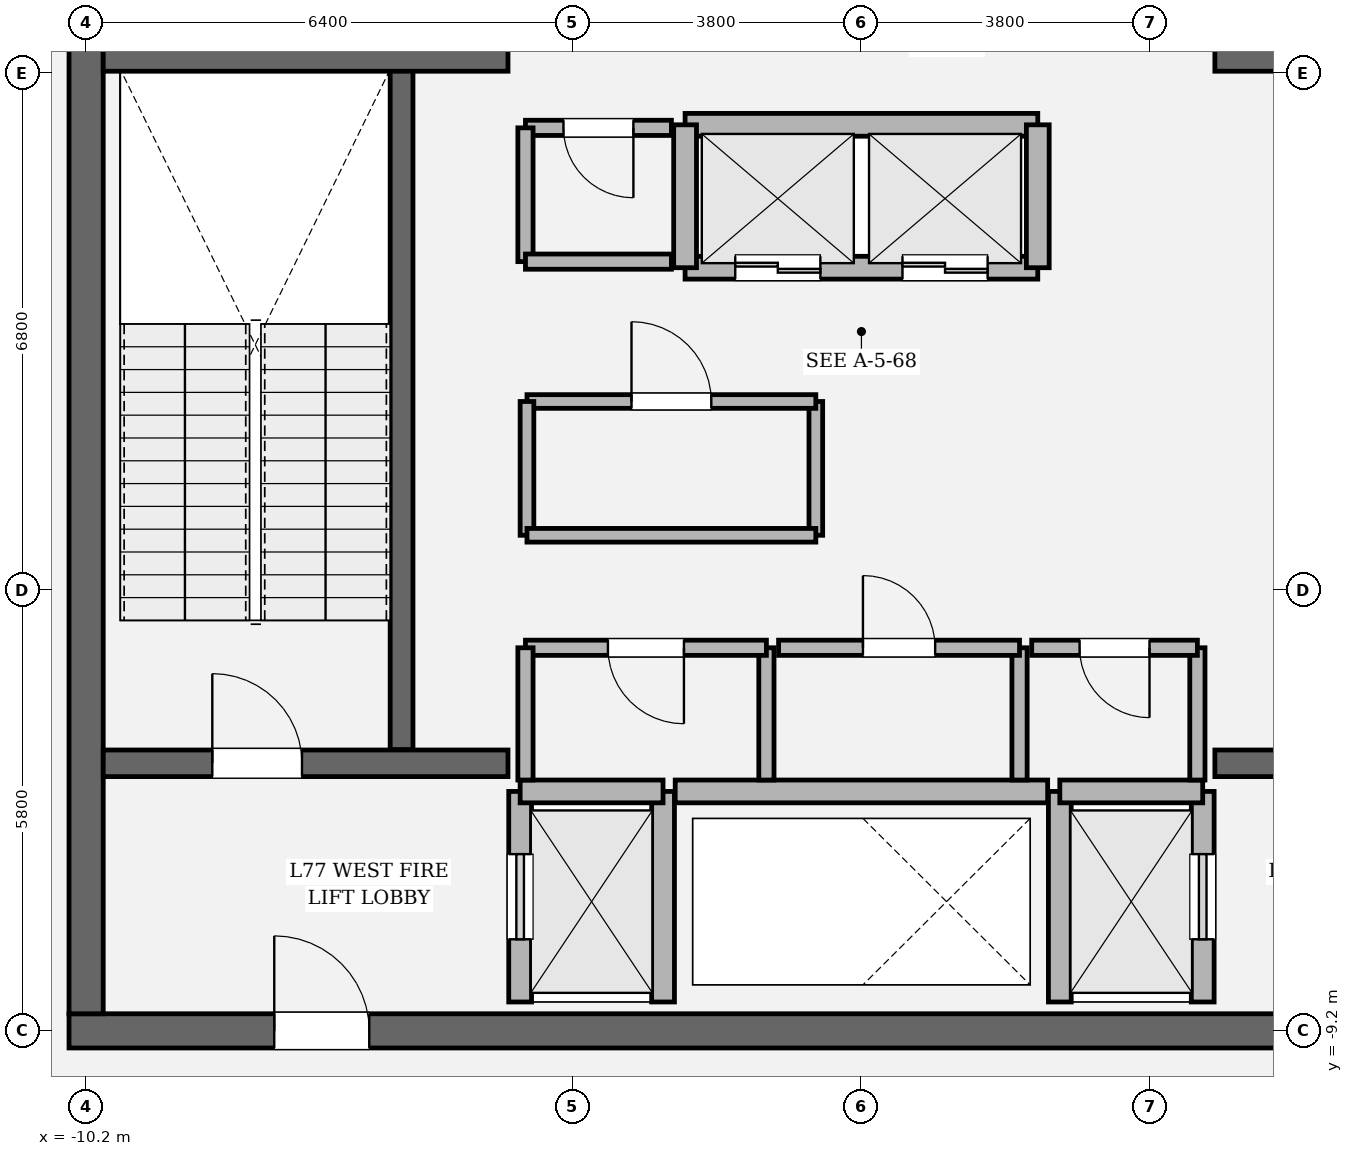
"""IFC4 building model, lengths in metres.
Left out: names, types, materials, properties, quantities, classifications, styles, units other than length and angle.
Written with IfcOpenShell. Run it as: python <this file> out.ifc"""

import sys

from ifc_helpers import new_model, si_unit, direction, frame, frame_2d, origin, place, context, subcontext, project, spatial, rectangle, extrude, element, fill, save


model = new_model("IFC4")
c1 = context("Model", 3, precision=1e-05, world=origin(), true_north=direction((0.0, 1.0)))
c2 = subcontext(c1, "Body", "Model", "MODEL_VIEW")
j1 = project(units=[si_unit("LENGTHUNIT", "METRE"), si_unit("PLANEANGLEUNIT", "RADIAN")], contexts=[c1])
p1 = place(None, origin())
s1 = spatial("IfcSite", under=j1, at=p1, CompositionType="ELEMENT")
p2 = place(p1, origin())
s2 = spatial("IfcBuilding", under=s1, at=p2, CompositionType="ELEMENT")
p3 = place(p2, frame((0.0, 0.0, 325.8)))
s3 = spatial("IfcBuildingStorey", under=s2, at=p3, CompositionType="ELEMENT", Elevation=325.8)
p4 = place(p3, frame((10.425, -9.2, 0.0), z_axis=(0.0, 0.0, 1.0), x_axis=(-1.0, 0.0, 0.0)))
e1 = element("IfcWall", 1, at=p4, inside=s3, PredefinedType="SHEAR", context=c2, shape_type="SweptSolid", body=[
    extrude(rectangle(XDim=20.85, YDim=0.45, at=frame_2d((10.425, 0.0))), origin(), (0.0, 0.0, 1.0), 4.2),
])
p5 = place(p4, frame((2.7, 0.0, 0.0)))
e2 = element("IfcOpeningElement", 2, at=p5, cuts=e1, PredefinedType="OPENING", context=c2, shape_type="SweptSolid", body=[
    extrude(rectangle(XDim=1.25, YDim=2.25, at=frame_2d((0.625, 1.125))), frame((0.0, 0.235, 0.0), z_axis=(0.0, -1.0, 0.0), x_axis=(1.0, 0.0, 0.0)), (0.0, 0.0, 1.0), 0.47),
])
p6 = place(p4, frame((16.9, 0.0, 0.0)))
e3 = element("IfcOpeningElement", 3, at=p6, cuts=e1, PredefinedType="OPENING", context=c2, shape_type="SweptSolid", body=[
    extrude(rectangle(XDim=1.25, YDim=2.25, at=frame_2d((0.625, 1.125))), frame((0.0, 0.235, 0.0), z_axis=(0.0, -1.0, 0.0), x_axis=(1.0, 0.0, 0.0)), (0.0, 0.0, 1.0), 0.47),
])
p7 = place(p3, frame((-10.2, -8.975, 0.0), z_axis=(0.0, 0.0, 1.0), x_axis=(0.0, 1.0, 0.0)))
e4 = element("IfcWall", 4, at=p7, inside=s3, PredefinedType="SHEAR", context=c2, shape_type="SweptSolid", body=[
    extrude(rectangle(XDim=17.95, YDim=0.45, at=frame_2d((8.975, 0.0))), origin(), (0.0, 0.0, 1.0), 4.2),
])
p8 = place(p7, frame((12.765, 0.0, 0.0)))
e5 = element("IfcOpeningElement", 5, at=p8, cuts=e4, PredefinedType="OPENING", context=c2, shape_type="SweptSolid", body=[
    extrude(rectangle(XDim=1.18, YDim=2.2, at=frame_2d((0.59, 1.1))), frame((0.0, 0.235, 0.0), z_axis=(0.0, -1.0, 0.0), x_axis=(1.0, 0.0, 0.0)), (0.0, 0.0, 1.0), 0.47),
])
p9 = place(p3, frame((-6.05, -5.5, 0.0), z_axis=(0.0, 0.0, 1.0), x_axis=(0.0, 1.0, 0.0)))
e6 = element("IfcWall", 6, at=p9, inside=s3, PredefinedType="SOLIDWALL", context=c2, shape_type="SweptSolid", body=[
    extrude(rectangle(XDim=8.95, YDim=0.3, at=frame_2d((4.475, 0.0))), origin(), (0.0, 0.0, 1.0), 4.2),
])
p10 = place(p3, frame((-9.975, -5.68, 0.0), z_axis=(0.0, 0.0, 1.0), x_axis=(1.0, 0.0, 0.0)))
e7 = element("IfcWall", 7, at=p10, inside=s3, PredefinedType="SOLIDWALL", context=c2, shape_type="SweptSolid", body=[
    extrude(rectangle(XDim=5.325, YDim=0.35, at=frame_2d((2.663, 0.0))), origin(), (0.0, 0.0, 1.0), 4.2),
])
p11 = place(p10, frame((1.435, 0.0, 0.0)))
e8 = element("IfcOpeningElement", 8, at=p11, cuts=e7, PredefinedType="OPENING", context=c2, shape_type="SweptSolid", body=[
    extrude(rectangle(XDim=1.18, YDim=2.2, at=frame_2d((0.59, 1.1))), frame((0.0, 0.185, 0.0), z_axis=(0.0, -1.0, 0.0), x_axis=(1.0, 0.0, 0.0)), (0.0, 0.0, 1.0), 0.37),
])
p12 = place(p3, frame((4.65, -5.68, 0.0), z_axis=(0.0, 0.0, 1.0), x_axis=(1.0, 0.0, 0.0)))
e9 = element("IfcWall", 9, at=p12, inside=s3, PredefinedType="SOLIDWALL", context=c2, shape_type="SweptSolid", body=[
    extrude(rectangle(XDim=5.325, YDim=0.35, at=frame_2d((2.663, 0.0))), origin(), (0.0, 0.0, 1.0), 4.2),
])
p13 = place(p12, frame((2.71, 0.0, 0.0)))
e10 = element("IfcOpeningElement", 10, at=p13, cuts=e9, PredefinedType="OPENING", context=c2, shape_type="SweptSolid", body=[
    extrude(rectangle(XDim=1.18, YDim=2.2, at=frame_2d((0.59, 1.1))), frame((0.0, 0.185, 0.0), z_axis=(0.0, -1.0, 0.0), x_axis=(1.0, 0.0, 0.0)), (0.0, 0.0, 1.0), 0.37),
])
for number, where, z_axis, x_axis in (
    (11, (-9.975, 3.6, 0.0), (0.0, 0.0, 1.0), (1.0, 0.0, 0.0)),
    (12, (4.65, 3.6, 0.0), (0.0, 0.0, 1.0), (1.0, 0.0, 0.0)),
):
    element("IfcWall", number, at=place(p3, frame(where, z_axis=z_axis, x_axis=x_axis)), inside=s3, PredefinedType="SOLIDWALL", context=c2, shape_type="SweptSolid", body=[
        extrude(rectangle(XDim=5.325, YDim=0.35, at=frame_2d((2.663, 0.0))), origin(), (0.0, 0.0, 1.0), 4.2),
    ])
p14 = place(p3, frame((-4.49, -8.82, 0.0), z_axis=(0.0, 0.0, 1.0), x_axis=(0.0, 1.0, 0.0)))
e13 = element("IfcWall", 13, at=p14, inside=s3, PredefinedType="SOLIDWALL", context=c2, shape_type="SweptSolid", body=[
    extrude(rectangle(XDim=2.77, YDim=0.3, at=frame_2d((1.385, 0.0))), origin(), (0.0, 0.0, 1.0), 4.0),
])
p15 = place(p14, frame((0.825, 0.0, 0.0)))
e14 = element("IfcOpeningElement", 14, at=p15, cuts=e13, PredefinedType="OPENING", context=c2, shape_type="SweptSolid", body=[
    extrude(rectangle(XDim=1.12, YDim=2.25, at=frame_2d((0.56, 1.125))), frame((0.0, 0.16, 0.0), z_axis=(0.0, -1.0, 0.0), x_axis=(1.0, 0.0, 0.0)), (0.0, 0.0, 1.0), 0.32),
])
p16 = place(p3, frame((-2.61, -8.82, 0.0), z_axis=(0.0, 0.0, 1.0), x_axis=(0.0, 1.0, 0.0)))
e15 = element("IfcWall", 15, at=p16, inside=s3, PredefinedType="SOLIDWALL", context=c2, shape_type="SweptSolid", body=[
    extrude(rectangle(XDim=2.77, YDim=0.3, at=frame_2d((1.385, 0.0))), origin(), (0.0, 0.0, 1.0), 4.0),
])
p17 = place(p3, frame((-4.49, -6.05, 0.0), z_axis=(0.0, 0.0, 1.0), x_axis=(1.0, 0.0, 0.0)))
e16 = element("IfcWall", 16, at=p17, inside=s3, PredefinedType="SOLIDWALL", context=c2, shape_type="SweptSolid", body=[
    extrude(rectangle(XDim=1.88, YDim=0.3, at=frame_2d((0.94, 0.0))), origin(), (0.0, 0.0, 1.0), 4.0),
])
p18 = place(p3, frame((4.49, -8.82, 0.0), z_axis=(0.0, 0.0, 1.0), x_axis=(0.0, 1.0, 0.0)))
e17 = element("IfcWall", 17, at=p18, inside=s3, PredefinedType="SOLIDWALL", context=c2, shape_type="SweptSolid", body=[
    extrude(rectangle(XDim=2.77, YDim=0.3, at=frame_2d((1.385, 0.0))), origin(), (0.0, 0.0, 1.0), 4.0),
])
p19 = place(p18, frame((0.825, 0.0, 0.0)))
e18 = element("IfcOpeningElement", 18, at=p19, cuts=e17, PredefinedType="OPENING", context=c2, shape_type="SweptSolid", body=[
    extrude(rectangle(XDim=1.12, YDim=2.25, at=frame_2d((0.56, 1.125))), frame((0.0, 0.16, 0.0), z_axis=(0.0, -1.0, 0.0), x_axis=(1.0, 0.0, 0.0)), (0.0, 0.0, 1.0), 0.32),
])
p20 = place(p3, frame((2.61, -8.82, 0.0), z_axis=(0.0, 0.0, 1.0), x_axis=(0.0, 1.0, 0.0)))
e19 = element("IfcWall", 19, at=p20, inside=s3, PredefinedType="SOLIDWALL", context=c2, shape_type="SweptSolid", body=[
    extrude(rectangle(XDim=2.77, YDim=0.3, at=frame_2d((1.385, 0.0))), origin(), (0.0, 0.0, 1.0), 4.0),
])
p21 = place(p3, frame((2.61, -6.05, 0.0), z_axis=(0.0, 0.0, 1.0), x_axis=(1.0, 0.0, 0.0)))
e20 = element("IfcWall", 20, at=p21, inside=s3, PredefinedType="SOLIDWALL", context=c2, shape_type="SweptSolid", body=[
    extrude(rectangle(XDim=1.88, YDim=0.3, at=frame_2d((0.94, 0.0))), origin(), (0.0, 0.0, 1.0), 4.0),
])
p22 = place(p3, frame((-2.32, 0.84, 0.0), z_axis=(0.0, 0.0, 1.0), x_axis=(1.0, 0.0, 0.0)))
e21 = element("IfcWall", 21, at=p22, inside=s3, PredefinedType="SOLIDWALL", context=c2, shape_type="SweptSolid", body=[
    extrude(rectangle(XDim=4.64, YDim=0.3, at=frame_2d((2.32, 0.0))), origin(), (0.0, 0.0, 1.0), 4.0),
])
p23 = place(p22, frame((0.66, 0.0, 0.0)))
e22 = element("IfcOpeningElement", 22, at=p23, cuts=e21, PredefinedType="OPENING", context=c2, shape_type="SweptSolid", body=[
    extrude(rectangle(XDim=1.12, YDim=2.25, at=frame_2d((0.56, 1.125))), frame((0.0, 0.16, 0.0), z_axis=(0.0, -1.0, 0.0), x_axis=(1.0, 0.0, 0.0)), (0.0, 0.0, 1.0), 0.32),
])
p24 = place(p22, frame((2.86, 0.0, 0.0)))
e23 = element("IfcOpeningElement", 23, at=p24, cuts=e21, PredefinedType="OPENING", context=c2, shape_type="SweptSolid", body=[
    extrude(rectangle(XDim=1.12, YDim=2.25, at=frame_2d((0.56, 1.125))), frame((0.0, 0.16, 0.0), z_axis=(0.0, -1.0, 0.0), x_axis=(1.0, 0.0, 0.0)), (0.0, 0.0, 1.0), 0.32),
])
p25 = place(p3, frame((-2.32, 2.72, 0.0), z_axis=(0.0, 0.0, 1.0), x_axis=(1.0, 0.0, 0.0)))
e24 = element("IfcWall", 24, at=p25, inside=s3, PredefinedType="SOLIDWALL", context=c2, shape_type="SweptSolid", body=[
    extrude(rectangle(XDim=4.64, YDim=0.3, at=frame_2d((2.32, 0.0))), origin(), (0.0, 0.0, 1.0), 4.0),
])
for number, where, z_axis, x_axis in (
    (25, (-2.32, 0.84, 0.0), (0.0, 0.0, 1.0), (0.0, 1.0, 0.0)),
    (26, (2.32, 0.84, 0.0), (0.0, 0.0, 1.0), (0.0, 1.0, 0.0)),
):
    element("IfcWall", number, at=place(p3, frame(where, z_axis=z_axis, x_axis=x_axis)), inside=s3, PredefinedType="SOLIDWALL", context=c2, shape_type="SweptSolid", body=[
        extrude(rectangle(XDim=1.88, YDim=0.3, at=frame_2d((0.94, 0.0))), origin(), (0.0, 0.0, 1.0), 4.0),
    ])
p26 = place(p3, frame((-2.45, -6.05, 0.0), z_axis=(0.0, 0.0, 1.0), x_axis=(1.0, 0.0, 0.0)))
e27 = element("IfcWall", 27, at=p26, inside=s3, PredefinedType="SOLIDWALL", context=c2, shape_type="SweptSolid", body=[
    extrude(rectangle(XDim=4.9, YDim=0.3, at=frame_2d((2.45, 0.0))), origin(), (0.0, 0.0, 1.0), 4.0),
])
p27 = place(p3, frame((-1.25, -5.9, 0.0), z_axis=(0.0, 0.0, 1.0), x_axis=(0.0, 1.0, 0.0)))
e28 = element("IfcWall", 28, at=p27, inside=s3, PredefinedType="SOLIDWALL", context=c2, shape_type="SweptSolid", body=[
    extrude(rectangle(XDim=1.74, YDim=0.2, at=frame_2d((0.87, 0.0))), origin(), (0.0, 0.0, 1.0), 4.0),
])
p28 = place(p3, frame((-1.25, -4.16, 0.0), z_axis=(0.0, 0.0, 1.0), x_axis=(-1.0, 0.0, 0.0)))
e29 = element("IfcWall", 29, at=p28, inside=s3, PredefinedType="SOLIDWALL", context=c2, shape_type="SweptSolid", body=[
    extrude(rectangle(XDim=3.17, YDim=0.2, at=frame_2d((1.585, 0.0))), origin(), (0.0, 0.0, 1.0), 4.0),
])
p29 = place(p28, frame((1.085, 0.0, 0.0)))
e30 = element("IfcOpeningElement", 30, at=p29, cuts=e29, PredefinedType="OPENING", context=c2, shape_type="SweptSolid", body=[
    extrude(rectangle(XDim=1.0, YDim=2.15, at=frame_2d((0.5, 1.075))), frame((0.0, 0.11, 0.0), z_axis=(0.0, -1.0, 0.0), x_axis=(1.0, 0.0, 0.0)), (0.0, 0.0, 1.0), 0.22),
])
for number, where, z_axis, x_axis in (
    (31, (-4.42, -4.16, 0.0), (0.0, 0.0, 1.0), (0.0, -1.0, 0.0)),
    (32, (2.08, -5.9, 0.0), (0.0, 0.0, 1.0), (0.0, 1.0, 0.0)),
):
    element("IfcWall", number, at=place(p3, frame(where, z_axis=z_axis, x_axis=x_axis)), inside=s3, PredefinedType="SOLIDWALL", context=c2, shape_type="SweptSolid", body=[
        extrude(rectangle(XDim=1.74, YDim=0.2, at=frame_2d((0.87, 0.0))), origin(), (0.0, 0.0, 1.0), 4.0),
    ])
p30 = place(p3, frame((2.08, -4.16, 0.0), z_axis=(0.0, 0.0, 1.0), x_axis=(-1.0, 0.0, 0.0)))
e33 = element("IfcWall", 33, at=p30, inside=s3, PredefinedType="SOLIDWALL", context=c2, shape_type="SweptSolid", body=[
    extrude(rectangle(XDim=3.17, YDim=0.2, at=frame_2d((1.585, 0.0))), origin(), (0.0, 0.0, 1.0), 4.0),
])
p31 = place(p30, frame((1.11, 0.0, 0.0)))
e34 = element("IfcOpeningElement", 34, at=p31, cuts=e33, PredefinedType="OPENING", context=c2, shape_type="SweptSolid", body=[
    extrude(rectangle(XDim=0.95, YDim=2.15, at=frame_2d((0.475, 1.075))), frame((0.0, 0.11, 0.0), z_axis=(0.0, -1.0, 0.0), x_axis=(1.0, 0.0, 0.0)), (0.0, 0.0, 1.0), 0.22),
])
p32 = place(p3, frame((4.42, -5.9, 0.0), z_axis=(0.0, 0.0, 1.0), x_axis=(0.0, 1.0, 0.0)))
e35 = element("IfcWall", 35, at=p32, inside=s3, PredefinedType="SOLIDWALL", context=c2, shape_type="SweptSolid", body=[
    extrude(rectangle(XDim=1.74, YDim=0.2, at=frame_2d((0.87, 0.0))), origin(), (0.0, 0.0, 1.0), 4.0),
])
p33 = place(p3, frame((4.42, -4.16, 0.0), z_axis=(0.0, 0.0, 1.0), x_axis=(-1.0, 0.0, 0.0)))
e36 = element("IfcWall", 36, at=p33, inside=s3, PredefinedType="SOLIDWALL", context=c2, shape_type="SweptSolid", body=[
    extrude(rectangle(XDim=2.18, YDim=0.2, at=frame_2d((1.09, 0.0))), origin(), (0.0, 0.0, 1.0), 4.0),
])
p34 = place(p33, frame((0.63, 0.0, 0.0)))
e37 = element("IfcOpeningElement", 37, at=p34, cuts=e36, PredefinedType="OPENING", context=c2, shape_type="SweptSolid", body=[
    extrude(rectangle(XDim=0.92, YDim=2.1, at=frame_2d((0.46, 1.05))), frame((0.0, 0.11, 0.0), z_axis=(0.0, -1.0, 0.0), x_axis=(1.0, 0.0, 0.0)), (0.0, 0.0, 1.0), 0.22),
])
p35 = place(p3, frame((-0.6, -2.68, 0.0), z_axis=(0.0, 0.0, 1.0), x_axis=(0.0, 1.0, 0.0)))
e38 = element("IfcWall", 38, at=p35, inside=s3, PredefinedType="PARTITIONING", context=c2, shape_type="SweptSolid", body=[
    extrude(rectangle(XDim=1.76, YDim=0.18, at=frame_2d((0.88, 0.0))), origin(), (0.0, 0.0, 1.0), 4.0),
])
p36 = place(p3, frame((-0.6, -0.92, 0.0), z_axis=(0.0, 0.0, 1.0), x_axis=(-1.0, 0.0, 0.0)))
e39 = element("IfcWall", 39, at=p36, inside=s3, PredefinedType="PARTITIONING", context=c2, shape_type="SweptSolid", body=[
    extrude(rectangle(XDim=3.8, YDim=0.18, at=frame_2d((1.9, 0.0))), origin(), (0.0, 0.0, 1.0), 4.0),
])
p37 = place(p36, frame((1.375, 0.0, 0.0)))
e40 = element("IfcOpeningElement", 40, at=p37, cuts=e39, PredefinedType="OPENING", context=c2, shape_type="SweptSolid", body=[
    extrude(rectangle(XDim=1.05, YDim=2.2, at=frame_2d((0.525, 1.1))), frame((0.0, 0.1, 0.0), z_axis=(0.0, -1.0, 0.0), x_axis=(1.0, 0.0, 0.0)), (0.0, 0.0, 1.0), 0.2),
])
p38 = place(p3, frame((-4.4, -0.92, 0.0), z_axis=(0.0, 0.0, 1.0), x_axis=(0.0, -1.0, 0.0)))
e41 = element("IfcWall", 41, at=p38, inside=s3, PredefinedType="PARTITIONING", context=c2, shape_type="SweptSolid", body=[
    extrude(rectangle(XDim=1.76, YDim=0.18, at=frame_2d((0.88, 0.0))), origin(), (0.0, 0.0, 1.0), 4.0),
])
p39 = place(p3, frame((-4.4, -2.68, 0.0), z_axis=(0.0, 0.0, 1.0), x_axis=(1.0, 0.0, 0.0)))
e42 = element("IfcWall", 42, at=p39, inside=s3, PredefinedType="PARTITIONING", context=c2, shape_type="SweptSolid", body=[
    extrude(rectangle(XDim=3.8, YDim=0.18, at=frame_2d((1.9, 0.0))), origin(), (0.0, 0.0, 1.0), 4.0),
])
p40 = place(p3, frame((-2.5, 2.68, 0.0), z_axis=(0.0, 0.0, 1.0), x_axis=(-1.0, 0.0, 0.0)))
e43 = element("IfcWall", 43, at=p40, inside=s3, PredefinedType="SOLIDWALL", context=c2, shape_type="SweptSolid", body=[
    extrude(rectangle(XDim=1.92, YDim=0.2, at=frame_2d((0.96, 0.0))), origin(), (0.0, 0.0, 1.0), 4.0),
])
p41 = place(p40, frame((0.5, 0.0, 0.0)))
e44 = element("IfcOpeningElement", 44, at=p41, cuts=e43, PredefinedType="OPENING", context=c2, shape_type="SweptSolid", body=[
    extrude(rectangle(XDim=0.92, YDim=2.1, at=frame_2d((0.46, 1.05))), frame((0.0, 0.11, 0.0), z_axis=(0.0, -1.0, 0.0), x_axis=(1.0, 0.0, 0.0)), (0.0, 0.0, 1.0), 0.22),
])
p42 = place(p3, frame((-4.42, 2.68, 0.0), z_axis=(0.0, 0.0, 1.0), x_axis=(0.0, -1.0, 0.0)))
e45 = element("IfcWall", 45, at=p42, inside=s3, PredefinedType="SOLIDWALL", context=c2, shape_type="SweptSolid", body=[
    extrude(rectangle(XDim=1.76, YDim=0.2, at=frame_2d((0.88, 0.0))), origin(), (0.0, 0.0, 1.0), 4.0),
])
p43 = place(p3, frame((-4.42, 0.92, 0.0), z_axis=(0.0, 0.0, 1.0), x_axis=(1.0, 0.0, 0.0)))
e46 = element("IfcWall", 46, at=p43, inside=s3, PredefinedType="SOLIDWALL", context=c2, shape_type="SweptSolid", body=[
    extrude(rectangle(XDim=1.92, YDim=0.2, at=frame_2d((0.96, 0.0))), origin(), (0.0, 0.0, 1.0), 4.0),
])
p44 = place(p11, origin())
e47 = element("IfcDoor", 47, at=p44, inside=s3, OperationType="SINGLE_SWING_LEFT", PredefinedType="DOOR", context=c2, shape_type="SweptSolid", body=[
    extrude(rectangle(XDim=1.18, YDim=2.2, at=frame_2d((0.59, 1.1))), frame((0.0, 0.025, 0.0), z_axis=(0.0, -1.0, 0.0), x_axis=(1.0, 0.0, 0.0)), (0.0, 0.0, 1.0), 0.05),
])
fill(e8, e47)
p45 = place(p6, origin())
e48 = element("IfcDoor", 48, at=p45, inside=s3, OperationType="SINGLE_SWING_RIGHT", PredefinedType="DOOR", context=c2, shape_type="SweptSolid", body=[
    extrude(rectangle(XDim=1.25, YDim=2.25, at=frame_2d((0.625, 1.125))), frame((0.0, 0.025, 0.0), z_axis=(0.0, -1.0, 0.0), x_axis=(1.0, 0.0, 0.0)), (0.0, 0.0, 1.0), 0.05),
])
fill(e3, e48)
p46 = place(p15, origin())
e49 = element("IfcDoor", 49, at=p46, inside=s3, OperationType="SLIDING_TO_LEFT", PredefinedType="DOOR", context=c2, shape_type="SweptSolid", body=[
    extrude(rectangle(XDim=1.12, YDim=2.25, at=frame_2d((0.56, 1.125))), frame((0.0, 0.025, 0.0), z_axis=(0.0, -1.0, 0.0), x_axis=(1.0, 0.0, 0.0)), (0.0, 0.0, 1.0), 0.05),
])
fill(e14, e49)
p47 = place(p19, origin())
e50 = element("IfcDoor", 50, at=p47, inside=s3, OperationType="SLIDING_TO_RIGHT", PredefinedType="DOOR", context=c2, shape_type="SweptSolid", body=[
    extrude(rectangle(XDim=1.12, YDim=2.25, at=frame_2d((0.56, 1.125))), frame((0.0, 0.025, 0.0), z_axis=(0.0, -1.0, 0.0), x_axis=(1.0, 0.0, 0.0)), (0.0, 0.0, 1.0), 0.05),
])
fill(e18, e50)
p48 = place(p23, origin())
e51 = element("IfcDoor", 51, at=p48, inside=s3, OperationType="DOUBLE_DOOR_SLIDING", PredefinedType="DOOR", context=c2, shape_type="SweptSolid", body=[
    extrude(rectangle(XDim=1.12, YDim=2.25, at=frame_2d((0.56, 1.125))), frame((0.0, 0.025, 0.0), z_axis=(0.0, -1.0, 0.0), x_axis=(1.0, 0.0, 0.0)), (0.0, 0.0, 1.0), 0.05),
])
fill(e22, e51)
p49 = place(p24, origin())
e52 = element("IfcDoor", 52, at=p49, inside=s3, OperationType="DOUBLE_DOOR_SLIDING", PredefinedType="DOOR", context=c2, shape_type="SweptSolid", body=[
    extrude(rectangle(XDim=1.12, YDim=2.25, at=frame_2d((0.56, 1.125))), frame((0.0, 0.025, 0.0), z_axis=(0.0, -1.0, 0.0), x_axis=(1.0, 0.0, 0.0)), (0.0, 0.0, 1.0), 0.05),
])
fill(e23, e52)
p50 = place(p29, origin())
e53 = element("IfcDoor", 53, at=p50, inside=s3, OperationType="SINGLE_SWING_LEFT", PredefinedType="DOOR", context=c2, shape_type="SweptSolid", body=[
    extrude(rectangle(XDim=1.0, YDim=2.15, at=frame_2d((0.5, 1.075))), frame((0.0, 0.025, 0.0), z_axis=(0.0, -1.0, 0.0), x_axis=(1.0, 0.0, 0.0)), (0.0, 0.0, 1.0), 0.05),
])
fill(e30, e53)
p51 = place(p31, origin())
e54 = element("IfcDoor", 54, at=p51, inside=s3, OperationType="SINGLE_SWING_RIGHT", PredefinedType="DOOR", context=c2, shape_type="SweptSolid", body=[
    extrude(rectangle(XDim=0.95, YDim=2.15, at=frame_2d((0.475, 1.075))), frame((0.0, 0.025, 0.0), z_axis=(0.0, -1.0, 0.0), x_axis=(1.0, 0.0, 0.0)), (0.0, 0.0, 1.0), 0.05),
])
fill(e34, e54)
p52 = place(p34, origin())
e55 = element("IfcDoor", 55, at=p52, inside=s3, OperationType="SINGLE_SWING_LEFT", PredefinedType="DOOR", context=c2, shape_type="SweptSolid", body=[
    extrude(rectangle(XDim=0.92, YDim=2.1, at=frame_2d((0.46, 1.05))), frame((0.0, 0.025, 0.0), z_axis=(0.0, -1.0, 0.0), x_axis=(1.0, 0.0, 0.0)), (0.0, 0.0, 1.0), 0.05),
])
fill(e37, e55)
p53 = place(p37, origin())
e56 = element("IfcDoor", 56, at=p53, inside=s3, OperationType="SINGLE_SWING_RIGHT", PredefinedType="DOOR", context=c2, shape_type="SweptSolid", body=[
    extrude(rectangle(XDim=1.05, YDim=2.2, at=frame_2d((0.525, 1.1))), frame((0.0, 0.025, 0.0), z_axis=(0.0, -1.0, 0.0), x_axis=(1.0, 0.0, 0.0)), (0.0, 0.0, 1.0), 0.05),
])
fill(e40, e56)
p54 = place(p41, origin())
e57 = element("IfcDoor", 57, at=p54, inside=s3, OperationType="SINGLE_SWING_LEFT", PredefinedType="DOOR", context=c2, shape_type="SweptSolid", body=[
    extrude(rectangle(XDim=0.92, YDim=2.1, at=frame_2d((0.46, 1.05))), frame((0.0, 0.025, 0.0), z_axis=(0.0, -1.0, 0.0), x_axis=(1.0, 0.0, 0.0)), (0.0, 0.0, 1.0), 0.05),
])
fill(e44, e57)
save(model, sys.argv[1])
